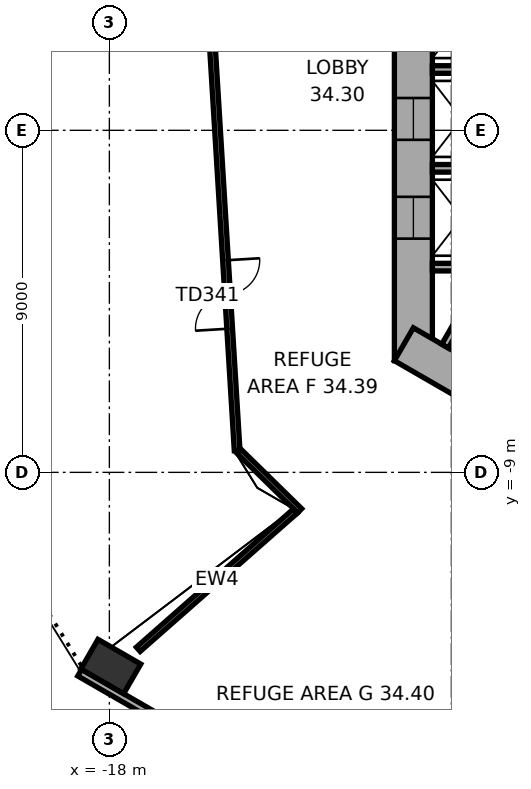
"""IFC4 building model, lengths in metres.
Left out: names, types, materials, properties, quantities, classifications, styles, units other than length and angle.
Written with IfcOpenShell. Run it as: python <this file> out.ifc"""

import sys

from ifc_helpers import new_model, si_unit, direction, frame, frame_2d, origin, origin_2d, place, context, subcontext, project, spatial, rectangle, extrude, element, fill, save


model = new_model("IFC4")
c1 = context("Model", 3, precision=1e-05, world=origin(), true_north=direction((0.0, 1.0)))
c2 = subcontext(c1, "Body", "Model", "MODEL_VIEW")
j1 = project(units=[si_unit("LENGTHUNIT", "METRE"), si_unit("PLANEANGLEUNIT", "RADIAN")], contexts=[c1])
p1 = place(None, origin())
s1 = spatial("IfcSite", under=j1, at=p1, CompositionType="ELEMENT")
p2 = place(p1, origin())
s2 = spatial("IfcBuilding", under=s1, at=p2, CompositionType="ELEMENT")
p3 = place(p2, frame((0.0, 0.0, 139.2)))
s3 = spatial("IfcBuildingStorey", under=s2, at=p3, CompositionType="ELEMENT", Elevation=139.2)
p4 = place(p3, frame((-17.962, -14.109, 0.0), z_axis=(0.0, 0.0, 1.0), x_axis=(0.866025403784, -0.5, 0.0)))
e1 = element("IfcColumn", 1, at=p4, inside=s3, PredefinedType="COLUMN", context=c2, shape_type="SweptSolid", body=[
    extrude(rectangle(XDim=1.3, YDim=0.9, at=origin_2d()), origin(), (0.0, 0.0, 1.0), 7.4),
])
p5 = place(p3, frame((-10.0, 6.062, 0.0), z_axis=(0.0, 0.0, 1.0), x_axis=(0.0, -1.0, 0.0)))
e2 = element("IfcWall", 2, at=p5, inside=s3, PredefinedType="SHEAR", context=c2, shape_type="SweptSolid", body=[
    extrude(rectangle(XDim=12.125, YDim=1.0, at=frame_2d((6.062, 0.0))), origin(), (0.0, 0.0, 1.0), 7.4),
])
p6 = place(p5, frame((5.212, 0.0, 0.0)))
e3 = element("IfcOpeningElement", 3, at=p6, cuts=e2, PredefinedType="OPENING", context=c2, shape_type="SweptSolid", body=[
    extrude(rectangle(XDim=1.1, YDim=2.1, at=frame_2d((0.55, 1.05))), frame((0.0, 0.51, 0.0), z_axis=(0.0, -1.0, 0.0), x_axis=(1.0, 0.0, 0.0)), (0.0, 0.0, 1.0), 1.02),
])
p7 = place(p5, frame((7.812, 0.0, 0.0)))
e4 = element("IfcOpeningElement", 4, at=p7, cuts=e2, PredefinedType="OPENING", context=c2, shape_type="SweptSolid", body=[
    extrude(rectangle(XDim=1.1, YDim=2.1, at=frame_2d((0.55, 1.05))), frame((0.0, 0.51, 0.0), z_axis=(0.0, -1.0, 0.0), x_axis=(1.0, 0.0, 0.0)), (0.0, 0.0, 1.0), 1.02),
])
p8 = place(p5, frame((2.612, 0.0, 0.0)))
e5 = element("IfcOpeningElement", 5, at=p8, cuts=e2, PredefinedType="OPENING", context=c2, shape_type="SweptSolid", body=[
    extrude(rectangle(XDim=1.1, YDim=2.1, at=frame_2d((0.55, 1.05))), frame((0.0, 0.51, 0.0), z_axis=(0.0, -1.0, 0.0), x_axis=(1.0, 0.0, 0.0)), (0.0, 0.0, 1.0), 1.02),
])
p9 = place(p3, frame((-10.25, -5.629, 0.0), z_axis=(0.0, 0.0, 1.0), x_axis=(0.866022616891, -0.50000482701, 0.0)))
e6 = element("IfcWall", 6, at=p9, inside=s3, PredefinedType="SHEAR", context=c2, shape_type="SweptSolid", body=[
    extrude(rectangle(XDim=12.125, YDim=1.0, at=frame_2d((6.062, 0.0))), origin(), (0.0, 0.0, 1.0), 7.4),
])
p10 = place(p9, frame((6.262, 0.0, 0.0)))
e7 = element("IfcOpeningElement", 7, at=p10, cuts=e6, PredefinedType="OPENING", context=c2, shape_type="SweptSolid", body=[
    extrude(rectangle(XDim=1.5, YDim=2.1, at=frame_2d((0.75, 1.05))), frame((0.0, 0.51, 0.0), z_axis=(0.0, -1.0, 0.0), x_axis=(1.0, 0.0, 0.0)), (0.0, 0.0, 1.0), 1.02),
])
p11 = place(p9, frame((1.712, 0.0, 0.0)))
e8 = element("IfcOpeningElement", 8, at=p11, cuts=e6, PredefinedType="OPENING", context=c2, shape_type="SweptSolid", body=[
    extrude(rectangle(XDim=1.1, YDim=2.1, at=frame_2d((0.55, 1.05))), frame((0.0, 0.51, 0.0), z_axis=(0.0, -1.0, 0.0), x_axis=(1.0, 0.0, 0.0)), (0.0, 0.0, 1.0), 1.02),
])
p12 = place(p9, frame((4.312, 0.0, 0.0)))
e9 = element("IfcOpeningElement", 9, at=p12, cuts=e6, PredefinedType="OPENING", context=c2, shape_type="SweptSolid", body=[
    extrude(rectangle(XDim=1.1, YDim=2.1, at=frame_2d((0.55, 1.05))), frame((0.0, 0.51, 0.0), z_axis=(0.0, -1.0, 0.0), x_axis=(1.0, 0.0, 0.0)), (0.0, 0.0, 1.0), 1.02),
])
p13 = place(p3, frame((-18.781, -14.271, 0.0), z_axis=(0.0, 0.0, 1.0), x_axis=(0.866026084105, -0.499998821648, 0.0)))
e10 = element("IfcWall", 10, at=p13, inside=s3, PredefinedType="STANDARD", context=c2, shape_type="SweptSolid", body=[
    extrude(rectangle(XDim=20.035, YDim=0.2, at=frame_2d((10.017, 0.0))), origin(), (0.0, 0.0, 1.0), 7.4),
])
p14 = place(p3, frame((-17.239, -13.656, 0.0), z_axis=(0.0, 0.0, 1.0), x_axis=(0.750678331628, 0.660667876034, 0.0)))
e11 = element("IfcWall", 11, at=p14, inside=s3, PredefinedType="STANDARD", context=c2, shape_type="SweptSolid", body=[
    extrude(rectangle(XDim=5.506, YDim=0.15, at=frame_2d((2.753, 0.0))), origin(), (0.0, 0.0, 1.0), 2.6),
])
p15 = place(p3, frame((-12.991, -10.01, 0.0), z_axis=(0.0, 0.0, 1.0), x_axis=(-0.714492233151, 0.69964337256, 0.0)))
e12 = element("IfcWall", 12, at=p15, inside=s3, PredefinedType="STANDARD", context=c2, shape_type="SweptSolid", body=[
    extrude(rectangle(XDim=2.236, YDim=0.15, at=frame_2d((1.118, 0.0))), origin(), (0.0, 0.0, 1.0), 2.6),
])
p16 = place(p3, frame((-14.638, -8.425, 0.0), z_axis=(0.0, 0.0, 1.0), x_axis=(-0.06105243285, 0.998134560289, 0.0)))
e13 = element("IfcWall", 13, at=p16, inside=s3, PredefinedType="STANDARD", context=c2, shape_type="SweptSolid", body=[
    extrude(rectangle(XDim=16.451, YDim=0.15, at=frame_2d((8.226, 0.0))), origin(), (0.0, 0.0, 1.0), 2.6),
])
p17 = place(p16, frame((3.213, 0.0, 0.0)))
e14 = element("IfcOpeningElement", 14, at=p17, cuts=e13, PredefinedType="OPENING", context=c2, shape_type="SweptSolid", body=[
    extrude(rectangle(XDim=1.8, YDim=2.4, at=frame_2d((0.9, 1.2))), frame((0.0, 0.085, 0.0), z_axis=(0.0, -1.0, 0.0), x_axis=(1.0, 0.0, 0.0)), (0.0, 0.0, 1.0), 0.17),
])
p18 = place(p16, frame((11.438, 0.0, 0.0)))
e15 = element("IfcOpeningElement", 15, at=p18, cuts=e13, PredefinedType="OPENING", context=c2, shape_type="SweptSolid", body=[
    extrude(rectangle(XDim=1.8, YDim=2.4, at=frame_2d((0.9, 1.2))), frame((0.0, 0.085, 0.0), z_axis=(0.0, -1.0, 0.0), x_axis=(1.0, 0.0, 0.0)), (0.0, 0.0, 1.0), 0.17),
])
for number, where, z_axis, x_axis in (
    (16, (-7.3, 1.6, 0.0), (0.0, 0.0, 1.0), (-1.0, 0.0, 0.0)),
    (17, (-7.3, -1.0, 0.0), (0.0, 0.0, 1.0), (-1.0, 0.0, 0.0)),
    (18, (-7.3, -3.6, 0.0), (0.0, 0.0, 1.0), (-1.0, 0.0, 0.0)),
    (19, (-8.067, -3.772, 0.0), (0.0, 0.0, 1.0), (-0.5, -0.866, 0.0)),
):
    element("IfcWall", number, at=place(p3, frame(where, z_axis=z_axis, x_axis=x_axis)), inside=s3, PredefinedType="PARTITIONING", context=c2, shape_type="SweptSolid", body=[
        extrude(rectangle(XDim=2.2, YDim=0.2, at=frame_2d((1.1, 0.0))), origin(), (0.0, 0.0, 1.0), 7.12),
    ])
p19 = place(p17, origin())
e20 = element("IfcDoor", 20, at=p19, inside=s3, OperationType="DOUBLE_DOOR_DOUBLE_SWING", PredefinedType="DOOR", context=c2, shape_type="SweptSolid", body=[
    extrude(rectangle(XDim=1.8, YDim=2.4, at=frame_2d((0.9, 1.2))), frame((0.0, 0.025, 0.0), z_axis=(0.0, -1.0, 0.0), x_axis=(1.0, 0.0, 0.0)), (0.0, 0.0, 1.0), 0.05),
])
fill(e14, e20)
p20 = place(p6, origin())
e21 = element("IfcDoor", 21, at=p20, inside=s3, OperationType="DOUBLE_DOOR_SLIDING", PredefinedType="DOOR", context=c2, shape_type="SweptSolid", body=[
    extrude(rectangle(XDim=1.1, YDim=2.1, at=frame_2d((0.55, 1.05))), frame((0.0, 0.025, 0.0), z_axis=(0.0, -1.0, 0.0), x_axis=(1.0, 0.0, 0.0)), (0.0, 0.0, 1.0), 0.05),
])
fill(e3, e21)
p21 = place(p7, origin())
e22 = element("IfcDoor", 22, at=p21, inside=s3, OperationType="DOUBLE_DOOR_SLIDING", PredefinedType="DOOR", context=c2, shape_type="SweptSolid", body=[
    extrude(rectangle(XDim=1.1, YDim=2.1, at=frame_2d((0.55, 1.05))), frame((0.0, 0.025, 0.0), z_axis=(0.0, -1.0, 0.0), x_axis=(1.0, 0.0, 0.0)), (0.0, 0.0, 1.0), 0.05),
])
fill(e4, e22)
save(model, sys.argv[1])
